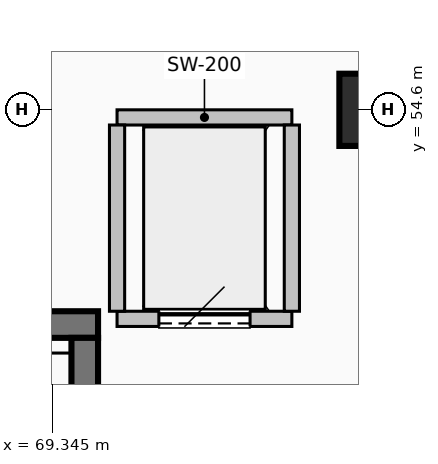
"""IFC4 building model, lengths in metres.
Left out: names, types, materials, properties, quantities, classifications, styles, units other than length and angle.
Written with IfcOpenShell. Run it as: python <this file> out.ifc"""

import sys

from ifc_helpers import new_model, si_unit, direction, frame, frame_2d, origin, origin_2d, place, context, subcontext, project, spatial, rectangle, extrude, element, fill, save


model = new_model("IFC4")
c1 = context("Model", 3, precision=1e-05, world=origin(), true_north=direction((0.0, 1.0)))
c2 = subcontext(c1, "Body", "Model", "MODEL_VIEW")
j1 = project(units=[si_unit("LENGTHUNIT", "METRE"), si_unit("PLANEANGLEUNIT", "RADIAN")], contexts=[c1])
p1 = place(None, origin())
s1 = spatial("IfcSite", under=j1, at=p1, CompositionType="ELEMENT")
p2 = place(p1, origin())
s2 = spatial("IfcBuilding", under=s1, at=p2, CompositionType="ELEMENT")
p3 = place(p2, frame((0.0, 0.0, -9.6)))
s3 = spatial("IfcBuildingStorey", under=s2, at=p3, CompositionType="ELEMENT", Elevation=-9.6)
p4 = place(p3, frame((73.6, 54.6, 0.0), z_axis=(0.0, 0.0, 1.0), x_axis=(1.0, 0.0, 0.0)))
e1 = element("IfcColumn", 1, at=p4, inside=s3, PredefinedType="COLUMN", context=c2, shape_type="SweptSolid", body=[
    extrude(rectangle(XDim=0.95, YDim=0.95, at=origin_2d()), origin(), (0.0, 0.0, 1.0), 4.8),
])
p5 = place(p3, frame((69.95, 51.775, 0.0), z_axis=(0.0, 0.0, 1.0), x_axis=(-1.0, 0.0, 0.0)))
e2 = element("IfcWall", 2, at=p5, inside=s3, PredefinedType="SHEAR", context=c2, shape_type="SweptSolid", body=[
    extrude(rectangle(XDim=8.5, YDim=0.35, at=frame_2d((4.25, 0.0))), origin(), (0.0, 0.0, 1.0), 4.5),
])
p6 = place(p3, frame((69.775, 51.6, 0.0), z_axis=(0.0, 0.0, 1.0), x_axis=(0.0, -1.0, 0.0)))
e3 = element("IfcWall", 3, at=p6, inside=s3, PredefinedType="SHEAR", context=c2, shape_type="SweptSolid", body=[
    extrude(rectangle(XDim=3.8, YDim=0.35, at=frame_2d((1.9, 0.0))), origin(), (0.0, 0.0, 1.0), 4.5),
])
p7 = place(p3, frame((70.2, 51.85, 0.0), z_axis=(0.0, 0.0, 1.0), x_axis=(1.0, 0.0, 0.0)))
e4 = element("IfcWall", 4, at=p7, inside=s3, PredefinedType="PARTITIONING", context=c2, shape_type="SweptSolid", body=[
    extrude(rectangle(XDim=2.3, YDim=0.2, at=frame_2d((1.15, 0.0))), origin(), (0.0, 0.0, 1.0), 4.492),
])
p8 = place(p7, frame((0.55, 0.0, 0.0)))
e5 = element("IfcOpeningElement", 5, at=p8, cuts=e4, PredefinedType="OPENING", context=c2, shape_type="SweptSolid", body=[
    extrude(rectangle(XDim=1.2, YDim=2.15, at=frame_2d((0.6, 1.075))), frame((0.0, 0.11, 0.0), z_axis=(0.0, -1.0, 0.0), x_axis=(1.0, 0.0, 0.0)), (0.0, 0.0, 1.0), 0.22),
])
p9 = place(p3, frame((72.5, 54.5, 0.0), z_axis=(0.0, 0.0, 1.0), x_axis=(-1.0, 0.0, 0.0)))
e6 = element("IfcWall", 6, at=p9, inside=s3, PredefinedType="PARTITIONING", context=c2, shape_type="SweptSolid", body=[
    extrude(rectangle(XDim=2.3, YDim=0.2, at=frame_2d((1.15, 0.0))), origin(), (0.0, 0.0, 1.0), 3.742),
])
for number, where, z_axis, x_axis in (
    (7, (70.2, 51.95, 0.0), (0.0, 0.0, 1.0), (0.0, 1.0, 0.0)),
    (8, (72.5, 54.4, 0.0), (0.0, 0.0, 1.0), (0.0, -1.0, 0.0)),
):
    element("IfcWall", number, at=place(p3, frame(where, z_axis=z_axis, x_axis=x_axis)), inside=s3, PredefinedType="PARTITIONING", context=c2, shape_type="SweptSolid", body=[
        extrude(rectangle(XDim=2.45, YDim=0.2, at=frame_2d((1.225, 0.0))), origin(), (0.0, 0.0, 1.0), 4.492),
    ])
p10 = place(p8, origin())
e9 = element("IfcDoor", 9, at=p10, inside=s3, OperationType="SLIDING_TO_LEFT", PredefinedType="DOOR", context=c2, shape_type="SweptSolid", body=[
    extrude(rectangle(XDim=1.2, YDim=2.15, at=frame_2d((0.6, 1.075))), frame((0.0, 0.025, 0.0), z_axis=(0.0, -1.0, 0.0), x_axis=(1.0, 0.0, 0.0)), (0.0, 0.0, 1.0), 0.05),
])
fill(e5, e9)
save(model, sys.argv[1])
